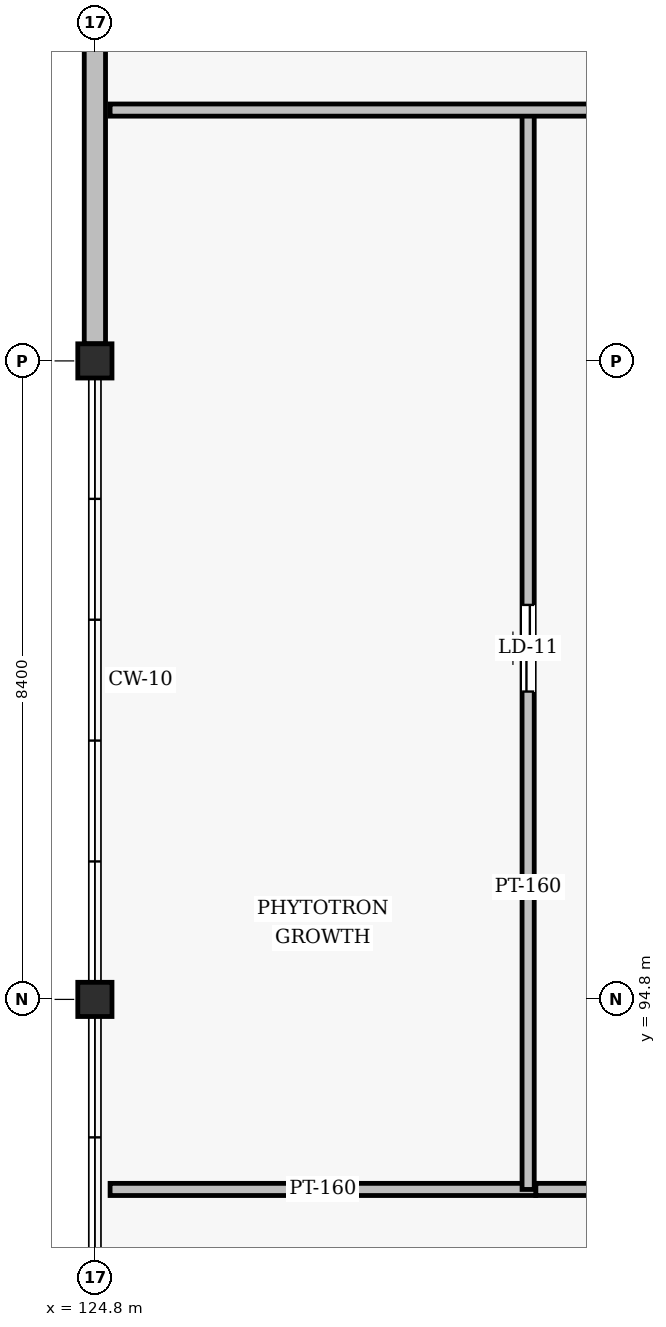
"""IFC4 building model, lengths in metres.
Left out: names, types, materials, properties, quantities, classifications, styles, units other than length and angle.
Written with IfcOpenShell. Run it as: python <this file> out.ifc"""

import sys

from ifc_helpers import new_model, si_unit, direction, frame, frame_2d, origin, origin_2d, place, context, subcontext, project, spatial, rectangle, hollow_rectangle, extrude, element, fill, save


model = new_model("IFC4")
c1 = context("Model", 3, precision=1e-05, world=origin(), true_north=direction((0.0, 1.0)))
c2 = subcontext(c1, "Body", "Model", "MODEL_VIEW")
j1 = project(units=[si_unit("LENGTHUNIT", "METRE"), si_unit("PLANEANGLEUNIT", "RADIAN")], contexts=[c1])
p1 = place(None, origin())
s1 = spatial("IfcSite", under=j1, at=p1, CompositionType="ELEMENT")
p2 = place(p1, origin())
s2 = spatial("IfcBuilding", under=s1, at=p2, CompositionType="ELEMENT")
p3 = place(p2, frame((0.0, 0.0, 43.2)))
s3 = spatial("IfcBuildingStorey", under=s2, at=p3, CompositionType="ELEMENT", Elevation=43.2)
for number, where, z_axis, x_axis in (
    (1, (124.8, 94.8, 0.0), (0.0, 0.0, 1.0), (1.0, 0.0, 0.0)),
    (2, (124.8, 103.2, 0.0), (0.0, 0.0, 1.0), (1.0, 0.0, 0.0)),
):
    element("IfcColumn", number, at=place(p3, frame(where, z_axis=z_axis, x_axis=x_axis)), inside=s3, PredefinedType="COLUMN", context=c2, shape_type="SweptSolid", body=[
        extrude(hollow_rectangle(XDim=0.45, YDim=0.45, WallThickness=0.018, InnerFilletRadius=0.018, OuterFilletRadius=0.036, at=origin_2d()), origin(), (0.0, 0.0, 1.0), 3.6),
    ])
p4 = place(p3, frame((124.8, 114.975, 0.0), z_axis=(0.0, 0.0, 1.0), x_axis=(0.0, -1.0, 0.0)))
e3 = element("IfcWall", 3, at=p4, inside=s3, PredefinedType="SOLIDWALL", context=c2, shape_type="SweptSolid", body=[
    extrude(rectangle(XDim=11.55, YDim=0.28, at=frame_2d((5.775, 0.0))), origin(), (0.0, 0.0, 1.0), 2.562),
])
p5 = place(p3, frame((130.6, 92.3, 0.0), z_axis=(0.0, 0.0, 1.0), x_axis=(1.0, 0.0, 0.0)))
e4 = element("IfcWall", 4, at=p5, inside=s3, PredefinedType="PARTITIONING", context=c2, shape_type="SweptSolid", body=[
    extrude(rectangle(XDim=19.4, YDim=0.16, at=frame_2d((9.7, 0.0))), origin(), (0.0, 0.0, 1.0), 2.854),
])
p6 = place(p5, frame((9.1, 0.0, 0.0)))
e5 = element("IfcOpeningElement", 5, at=p6, cuts=e4, PredefinedType="OPENING", context=c2, shape_type="SweptSolid", body=[
    extrude(rectangle(XDim=1.25, YDim=2.12, at=frame_2d((0.625, 1.06))), frame((0.0, 0.09, 0.0), z_axis=(0.0, -1.0, 0.0), x_axis=(1.0, 0.0, 0.0)), (0.0, 0.0, 1.0), 0.18),
])
p7 = place(p3, frame((125.0, 92.3, 0.0), z_axis=(0.0, 0.0, 1.0), x_axis=(1.0, 0.0, 0.0)))
e6 = element("IfcWall", 6, at=p7, inside=s3, PredefinedType="PARTITIONING", context=c2, shape_type="SweptSolid", body=[
    extrude(rectangle(XDim=5.6, YDim=0.16, at=frame_2d((2.8, 0.0))), origin(), (0.0, 0.0, 1.0), 3.354),
])
p8 = place(p3, frame((130.5, 92.3, 0.0), z_axis=(0.0, 0.0, 1.0), x_axis=(0.0, 1.0, 0.0)))
e7 = element("IfcWall", 7, at=p8, inside=s3, PredefinedType="PARTITIONING", context=c2, shape_type="SweptSolid", body=[
    extrude(rectangle(XDim=14.2, YDim=0.16, at=frame_2d((7.1, 0.0))), origin(), (0.0, 0.0, 1.0), 2.858),
])
p9 = place(p8, frame((6.55, 0.0, 0.0)))
e8 = element("IfcOpeningElement", 8, at=p9, cuts=e7, PredefinedType="OPENING", context=c2, shape_type="SweptSolid", body=[
    extrude(rectangle(XDim=1.14, YDim=2.12, at=frame_2d((0.57, 1.06))), frame((0.0, 0.09, 0.0), z_axis=(0.0, -1.0, 0.0), x_axis=(1.0, 0.0, 0.0)), (0.0, 0.0, 1.0), 0.18),
])
p10 = place(p3, frame((125.0, 106.5, 0.0), z_axis=(0.0, 0.0, 1.0), x_axis=(1.0, 0.0, 0.0)))
e9 = element("IfcWall", 9, at=p10, inside=s3, PredefinedType="PARTITIONING", context=c2, shape_type="SweptSolid", body=[
    extrude(rectangle(XDim=21.5, YDim=0.16, at=frame_2d((10.75, 0.0))), origin(), (0.0, 0.0, 1.0), 2.654),
])
p11 = place(p10, frame((10.15, 0.0, 0.0)))
e10 = element("IfcOpeningElement", 10, at=p11, cuts=e9, PredefinedType="OPENING", context=c2, shape_type="SweptSolid", body=[
    extrude(rectangle(XDim=1.25, YDim=2.12, at=frame_2d((0.625, 1.06))), frame((0.0, 0.09, 0.0), z_axis=(0.0, -1.0, 0.0), x_axis=(1.0, 0.0, 0.0)), (0.0, 0.0, 1.0), 0.18),
])
p12 = place(p9, origin())
e11 = element("IfcDoor", 11, at=p12, inside=s3, OperationType="SINGLE_SWING_RIGHT", PredefinedType="DOOR", context=c2, shape_type="SweptSolid", body=[
    extrude(rectangle(XDim=1.14, YDim=2.12, at=frame_2d((0.57, 1.06))), frame((0.0, 0.025, 0.0), z_axis=(0.0, -1.0, 0.0), x_axis=(1.0, 0.0, 0.0)), (0.0, 0.0, 1.0), 0.05),
])
fill(e8, e11)
save(model, sys.argv[1])
